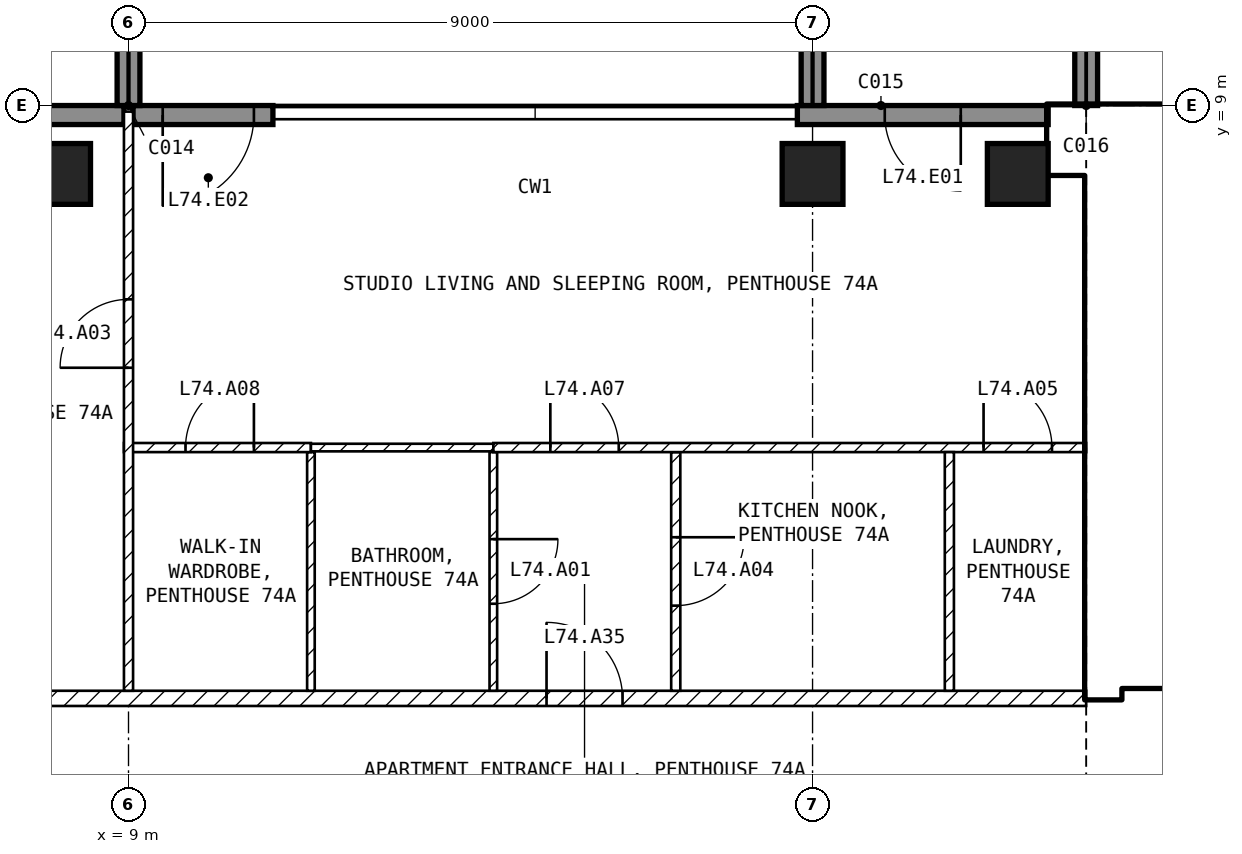
"""IFC4 building model, lengths in metres.
Left out: names, types, materials, properties, quantities, classifications, styles, units other than length and angle.
Written with IfcOpenShell. Run it as: python <this file> out.ifc"""

import sys

from ifc_helpers import new_model, si_unit, direction, frame, frame_2d, origin, origin_2d, place, context, subcontext, project, spatial, rectangle, extrude, element, fill, save


model = new_model("IFC4")
c1 = context("Model", 3, precision=1e-05, world=origin(), true_north=direction((0.0, 1.0)))
c2 = subcontext(c1, "Body", "Model", "MODEL_VIEW")
j1 = project(units=[si_unit("LENGTHUNIT", "METRE"), si_unit("PLANEANGLEUNIT", "RADIAN")], contexts=[c1])
p1 = place(None, origin())
s1 = spatial("IfcSite", under=j1, at=p1, CompositionType="ELEMENT")
p2 = place(p1, origin())
s2 = spatial("IfcBuilding", under=s1, at=p2, CompositionType="ELEMENT")
p3 = place(p2, frame((0.0, 0.0, 290.4)))
s3 = spatial("IfcBuildingStorey", under=s2, at=p3, CompositionType="ELEMENT", Elevation=290.4)
for number, where, z_axis, x_axis in (
    (1, (8.1, 8.1, -0.25), (0.0, 0.0, 1.0), (1.0, 0.0, 0.0)),
    (2, (18.0, 8.1, -0.25), (0.0, 0.0, 1.0), (1.0, 0.0, 0.0)),
    (3, (20.7, 8.1, -0.25), (0.0, 0.0, 1.0), (1.0, 0.0, 0.0)),
):
    element("IfcColumn", number, at=place(p3, frame(where, z_axis=z_axis, x_axis=x_axis)), inside=s3, PredefinedType="COLUMN", context=c2, shape_type="SweptSolid", body=[
        extrude(rectangle(XDim=0.8, YDim=0.8, at=origin_2d()), origin(), (0.0, 0.0, 1.0), 4.2),
    ])
p4 = place(p3, frame((21.1, 8.875, 0.0), z_axis=(0.0, 0.0, 1.0), x_axis=(-1.0, 0.0, 0.0)))
e4 = element("IfcWall", 4, at=p4, inside=s3, PredefinedType="SOLIDWALL", context=c2, shape_type="SweptSolid", body=[
    extrude(rectangle(XDim=3.3, YDim=0.25, at=frame_2d((1.65, 0.0))), origin(), (0.0, 0.0, 1.0), 3.95),
])
p5 = place(p4, frame((1.15, 0.0, 0.0)))
e5 = element("IfcOpeningElement", 5, at=p5, cuts=e4, PredefinedType="OPENING", context=c2, shape_type="SweptSolid", body=[
    extrude(rectangle(XDim=1.0, YDim=2.4, at=frame_2d((0.5, 1.2))), frame((0.0, 0.135, 0.0), z_axis=(0.0, -1.0, 0.0), x_axis=(1.0, 0.0, 0.0)), (0.0, 0.0, 1.0), 0.27),
])
p6 = place(p3, frame((10.9, 8.875, 0.0), z_axis=(0.0, 0.0, 1.0), x_axis=(-1.0, 0.0, 0.0)))
e6 = element("IfcWall", 6, at=p6, inside=s3, PredefinedType="SOLIDWALL", context=c2, shape_type="SweptSolid", body=[
    extrude(rectangle(XDim=1.84, YDim=0.25, at=frame_2d((0.92, 0.0))), origin(), (0.0, 0.0, 1.0), 3.95),
])
p7 = place(p6, frame((0.25, 0.0, 0.0)))
e7 = element("IfcOpeningElement", 7, at=p7, cuts=e6, PredefinedType="OPENING", context=c2, shape_type="SweptSolid", body=[
    extrude(rectangle(XDim=1.2, YDim=2.4, at=frame_2d((0.6, 1.2))), frame((0.0, 0.135, 0.0), z_axis=(0.0, -1.0, 0.0), x_axis=(1.0, 0.0, 0.0)), (0.0, 0.0, 1.0), 0.27),
])
p8 = place(p3, frame((8.94, 8.875, 0.0), z_axis=(0.0, 0.0, 1.0), x_axis=(-1.0, 0.0, 0.0)))
e8 = element("IfcWall", 8, at=p8, inside=s3, PredefinedType="SOLIDWALL", context=c2, shape_type="SweptSolid", body=[
    extrude(rectangle(XDim=3.04, YDim=0.25, at=frame_2d((1.52, 0.0))), origin(), (0.0, 0.0, 1.0), 3.95),
])
p9 = place(p8, frame((1.59, 0.0, 0.0)))
e9 = element("IfcOpeningElement", 9, at=p9, cuts=e8, PredefinedType="OPENING", context=c2, shape_type="SweptSolid", body=[
    extrude(rectangle(XDim=1.2, YDim=2.4, at=frame_2d((0.6, 1.2))), frame((0.0, 0.135, 0.0), z_axis=(0.0, -1.0, 0.0), x_axis=(1.0, 0.0, 0.0)), (0.0, 0.0, 1.0), 0.27),
])
for number, where, z_axis, x_axis in (
    (10, (9.0, 9.0, 0.0), (0.0, 0.0, 1.0), (0.0, 1.0, 0.0)),
    (11, (18.0, 9.0, 0.0), (0.0, 0.0, 1.0), (0.0, 1.0, 0.0)),
    (12, (21.6, 9.0, 0.0), (0.0, 0.0, 1.0), (0.0, 1.0, 0.0)),
):
    element("IfcWall", number, at=place(p3, frame(where, z_axis=z_axis, x_axis=x_axis)), inside=s3, PredefinedType="SOLIDWALL", context=c2, shape_type="SweptSolid", body=[
        extrude(rectangle(XDim=2.7, YDim=0.3, at=frame_2d((1.35, 0.0))), origin(), (0.0, 0.0, 1.0), 3.95),
    ])
p10 = place(p3, frame((21.1, 8.55, 0.0), z_axis=(0.0, 0.0, 1.0), x_axis=(1.0, 0.0, 0.0)))
e13 = element("IfcWall", 13, at=p10, inside=s3, PredefinedType="SHEAR", context=c2, shape_type="SweptSolid", body=[
    extrude(rectangle(XDim=8.65, YDim=0.9, at=frame_2d((4.325, 0.0))), origin(), (0.0, 0.0, 1.0), 3.95),
])
p11 = place(p3, frame((21.825, 1.2, 0.0), z_axis=(0.0, 0.0, 1.0), x_axis=(0.0, 1.0, 0.0)))
e14 = element("IfcWall", 14, at=p11, inside=s3, PredefinedType="SHEAR", context=c2, shape_type="SweptSolid", body=[
    extrude(rectangle(XDim=6.9, YDim=0.45, at=frame_2d((3.45, 0.0))), origin(), (0.0, 0.0, 1.0), 3.95),
])
p12 = place(p3, frame((22.05, 1.45, 0.0), z_axis=(0.0, 0.0, 1.0), x_axis=(1.0, 0.0, 0.0)))
e15 = element("IfcWall", 15, at=p12, inside=s3, PredefinedType="SOLIDWALL", context=c2, shape_type="SweptSolid", body=[
    extrude(rectangle(XDim=11.3, YDim=0.2, at=frame_2d((5.65, 0.0))), origin(), (0.0, 0.0, 1.0), 3.95),
])
p13 = place(p12, frame((0.75, 0.0, 0.0)))
e16 = element("IfcOpeningElement", 16, at=p13, cuts=e15, PredefinedType="OPENING", context=c2, shape_type="SweptSolid", body=[
    extrude(rectangle(XDim=1.0, YDim=2.1, at=frame_2d((0.5, 1.05))), frame((0.0, 0.11, 0.0), z_axis=(0.0, -1.0, 0.0), x_axis=(1.0, 0.0, 0.0)), (0.0, 0.0, 1.0), 0.22),
])
p14 = place(p12, frame((3.25, 0.0, 0.0)))
e17 = element("IfcOpeningElement", 17, at=p14, cuts=e15, PredefinedType="OPENING", context=c2, shape_type="SweptSolid", body=[
    extrude(rectangle(XDim=1.0, YDim=2.1, at=frame_2d((0.5, 1.05))), frame((0.0, 0.11, 0.0), z_axis=(0.0, -1.0, 0.0), x_axis=(1.0, 0.0, 0.0)), (0.0, 0.0, 1.0), 0.22),
])
p15 = place(p12, frame((9.225, 0.0, 0.0)))
e18 = element("IfcOpeningElement", 18, at=p15, cuts=e15, PredefinedType="OPENING", context=c2, shape_type="SweptSolid", body=[
    extrude(rectangle(XDim=0.9, YDim=2.1, at=frame_2d((0.45, 1.05))), frame((0.0, 0.11, 0.0), z_axis=(0.0, -1.0, 0.0), x_axis=(1.0, 0.0, 0.0)), (0.0, 0.0, 1.0), 0.22),
])
p16 = place(p3, frame((22.05, 5.15, 0.0), z_axis=(0.0, 0.0, 1.0), x_axis=(1.0, 0.0, 0.0)))
e19 = element("IfcWall", 19, at=p16, inside=s3, PredefinedType="SOLIDWALL", context=c2, shape_type="SweptSolid", body=[
    extrude(rectangle(XDim=6.3, YDim=0.2, at=frame_2d((3.15, 0.0))), origin(), (0.0, 0.0, 1.0), 3.95),
])
p17 = place(p16, frame((0.2, 0.0, 0.0)))
e20 = element("IfcOpeningElement", 20, at=p17, cuts=e19, PredefinedType="OPENING", context=c2, shape_type="SweptSolid", body=[
    extrude(rectangle(XDim=1.0, YDim=2.1, at=frame_2d((0.5, 1.05))), frame((0.0, 0.11, 0.0), z_axis=(0.0, -1.0, 0.0), x_axis=(1.0, 0.0, 0.0)), (0.0, 0.0, 1.0), 0.22),
])
p18 = place(p3, frame((1.1, 1.2, 0.0), z_axis=(0.0, 0.0, 1.0), x_axis=(1.0, 0.0, 0.0)))
e21 = element("IfcWall", 21, at=p18, inside=s3, PredefinedType="PARTITIONING", context=c2, shape_type="SweptSolid", body=[
    extrude(rectangle(XDim=20.5, YDim=0.2, at=frame_2d((10.25, 0.0))), origin(), (0.0, 0.0, 1.0), 3.95),
])
p19 = place(p18, frame((13.4, 0.0, 0.0)))
e22 = element("IfcOpeningElement", 22, at=p19, cuts=e21, PredefinedType="OPENING", context=c2, shape_type="SweptSolid", body=[
    extrude(rectangle(XDim=1.0, YDim=2.1, at=frame_2d((0.5, 1.05))), frame((0.0, 0.11, 0.0), z_axis=(0.0, -1.0, 0.0), x_axis=(1.0, 0.0, 0.0)), (0.0, 0.0, 1.0), 0.22),
])
p20 = place(p3, frame((11.4, 4.44, 0.0), z_axis=(0.0, 0.0, 1.0), x_axis=(0.0, -1.0, 0.0)))
e23 = element("IfcWall", 23, at=p20, inside=s3, PredefinedType="PARTITIONING", context=c2, shape_type="SweptSolid", body=[
    extrude(rectangle(XDim=3.14, YDim=0.1, at=frame_2d((1.57, 0.0))), origin(), (0.0, 0.0, 1.0), 3.95),
])
p21 = place(p3, frame((8.94, 4.5, 0.0), z_axis=(0.0, 0.0, 1.0), x_axis=(1.0, 0.0, 0.0)))
e24 = element("IfcWall", 24, at=p21, inside=s3, PredefinedType="PARTITIONING", context=c2, shape_type="SweptSolid", body=[
    extrude(rectangle(XDim=2.46, YDim=0.12, at=frame_2d((1.23, 0.0))), origin(), (0.0, 0.0, 1.0), 3.95),
])
p22 = place(p21, frame((0.81, 0.0, 0.0)))
e25 = element("IfcOpeningElement", 25, at=p22, cuts=e24, PredefinedType="OPENING", context=c2, shape_type="SweptSolid", body=[
    extrude(rectangle(XDim=0.9, YDim=2.1, at=frame_2d((0.45, 1.05))), frame((0.0, 0.07, 0.0), z_axis=(0.0, -1.0, 0.0), x_axis=(1.0, 0.0, 0.0)), (0.0, 0.0, 1.0), 0.14),
])
p23 = place(p3, frame((9.0, 1.3, 0.0), z_axis=(0.0, 0.0, 1.0), x_axis=(0.0, 1.0, 0.0)))
e26 = element("IfcWall", 26, at=p23, inside=s3, PredefinedType="PARTITIONING", context=c2, shape_type="SweptSolid", body=[
    extrude(rectangle(XDim=7.62, YDim=0.12, at=frame_2d((3.81, 0.0))), origin(), (0.0, 0.0, 1.0), 3.95),
])
p24 = place(p23, frame((4.25, 0.0, 0.0)))
e27 = element("IfcOpeningElement", 27, at=p24, cuts=e26, PredefinedType="OPENING", context=c2, shape_type="SweptSolid", body=[
    extrude(rectangle(XDim=0.9, YDim=2.1, at=frame_2d((0.45, 1.05))), frame((0.0, 0.07, 0.0), z_axis=(0.0, -1.0, 0.0), x_axis=(1.0, 0.0, 0.0)), (0.0, 0.0, 1.0), 0.14),
])
p25 = place(p3, frame((13.8, 4.44, 0.0), z_axis=(0.0, 0.0, 1.0), x_axis=(0.0, -1.0, 0.0)))
e28 = element("IfcWall", 28, at=p25, inside=s3, PredefinedType="PARTITIONING", context=c2, shape_type="SweptSolid", body=[
    extrude(rectangle(XDim=3.14, YDim=0.1, at=frame_2d((1.57, 0.0))), origin(), (0.0, 0.0, 1.0), 3.95),
])
p26 = place(p25, frame((1.145, 0.0, 0.0)))
e29 = element("IfcOpeningElement", 29, at=p26, cuts=e28, PredefinedType="OPENING", context=c2, shape_type="SweptSolid", body=[
    extrude(rectangle(XDim=0.85, YDim=2.1, at=frame_2d((0.425, 1.05))), frame((0.0, 0.06, 0.0), z_axis=(0.0, -1.0, 0.0), x_axis=(1.0, 0.0, 0.0)), (0.0, 0.0, 1.0), 0.12),
])
p27 = place(p3, frame((11.4, 4.5, 0.0), z_axis=(0.0, 0.0, 1.0), x_axis=(1.0, 0.0, 0.0)))
e30 = element("IfcWall", 30, at=p27, inside=s3, PredefinedType="PARTITIONING", context=c2, shape_type="SweptSolid", body=[
    extrude(rectangle(XDim=2.4, YDim=0.1, at=frame_2d((1.2, 0.0))), origin(), (0.0, 0.0, 1.0), 3.95),
])
p28 = place(p3, frame((16.2, 4.44, 0.0), z_axis=(0.0, 0.0, 1.0), x_axis=(0.0, -1.0, 0.0)))
e31 = element("IfcWall", 31, at=p28, inside=s3, PredefinedType="PARTITIONING", context=c2, shape_type="SweptSolid", body=[
    extrude(rectangle(XDim=3.14, YDim=0.12, at=frame_2d((1.57, 0.0))), origin(), (0.0, 0.0, 1.0), 3.95),
])
p29 = place(p28, frame((1.12, 0.0, 0.0)))
e32 = element("IfcOpeningElement", 32, at=p29, cuts=e31, PredefinedType="OPENING", context=c2, shape_type="SweptSolid", body=[
    extrude(rectangle(XDim=0.9, YDim=2.1, at=frame_2d((0.45, 1.05))), frame((0.0, 0.07, 0.0), z_axis=(0.0, -1.0, 0.0), x_axis=(1.0, 0.0, 0.0)), (0.0, 0.0, 1.0), 0.14),
])
p30 = place(p3, frame((13.8, 4.5, 0.0), z_axis=(0.0, 0.0, 1.0), x_axis=(1.0, 0.0, 0.0)))
e33 = element("IfcWall", 33, at=p30, inside=s3, PredefinedType="PARTITIONING", context=c2, shape_type="SweptSolid", body=[
    extrude(rectangle(XDim=7.8, YDim=0.12, at=frame_2d((3.9, 0.0))), origin(), (0.0, 0.0, 1.0), 3.95),
])
p31 = place(p30, frame((6.45, 0.0, 0.0)))
e34 = element("IfcOpeningElement", 34, at=p31, cuts=e33, PredefinedType="OPENING", context=c2, shape_type="SweptSolid", body=[
    extrude(rectangle(XDim=0.9, YDim=2.1, at=frame_2d((0.45, 1.05))), frame((0.0, 0.07, 0.0), z_axis=(0.0, -1.0, 0.0), x_axis=(1.0, 0.0, 0.0)), (0.0, 0.0, 1.0), 0.14),
])
p32 = place(p30, frame((0.75, 0.0, 0.0)))
e35 = element("IfcOpeningElement", 35, at=p32, cuts=e33, PredefinedType="OPENING", context=c2, shape_type="SweptSolid", body=[
    extrude(rectangle(XDim=0.9, YDim=2.1, at=frame_2d((0.45, 1.05))), frame((0.0, 0.07, 0.0), z_axis=(0.0, -1.0, 0.0), x_axis=(1.0, 0.0, 0.0)), (0.0, 0.0, 1.0), 0.14),
])
p33 = place(p3, frame((19.8, 4.44, 0.0), z_axis=(0.0, 0.0, 1.0), x_axis=(0.0, -1.0, 0.0)))
e36 = element("IfcWall", 36, at=p33, inside=s3, PredefinedType="PARTITIONING", context=c2, shape_type="SweptSolid", body=[
    extrude(rectangle(XDim=3.14, YDim=0.12, at=frame_2d((1.57, 0.0))), origin(), (0.0, 0.0, 1.0), 3.95),
])
p34 = place(p5, origin())
e37 = element("IfcDoor", 37, at=p34, inside=s3, OperationType="SINGLE_SWING_LEFT", PredefinedType="DOOR", context=c2, shape_type="SweptSolid", body=[
    extrude(rectangle(XDim=1.0, YDim=2.4, at=frame_2d((0.5, 1.2))), frame((0.0, 0.025, 0.0), z_axis=(0.0, -1.0, 0.0), x_axis=(1.0, 0.0, 0.0)), (0.0, 0.0, 1.0), 0.05),
])
fill(e5, e37)
p35 = place(p7, origin())
e38 = element("IfcDoor", 38, at=p35, inside=s3, OperationType="SINGLE_SWING_RIGHT", PredefinedType="DOOR", context=c2, shape_type="SweptSolid", body=[
    extrude(rectangle(XDim=1.2, YDim=2.4, at=frame_2d((0.6, 1.2))), frame((0.0, 0.025, 0.0), z_axis=(0.0, -1.0, 0.0), x_axis=(1.0, 0.0, 0.0)), (0.0, 0.0, 1.0), 0.05),
])
fill(e7, e38)
p36 = place(p17, origin())
e39 = element("IfcDoor", 39, at=p36, inside=s3, OperationType="SINGLE_SWING_LEFT", PredefinedType="DOOR", context=c2, shape_type="SweptSolid", body=[
    extrude(rectangle(XDim=1.0, YDim=2.1, at=frame_2d((0.5, 1.05))), frame((0.0, 0.025, 0.0), z_axis=(0.0, -1.0, 0.0), x_axis=(1.0, 0.0, 0.0)), (0.0, 0.0, 1.0), 0.05),
])
fill(e20, e39)
p37 = place(p26, origin())
e40 = element("IfcDoor", 40, at=p37, inside=s3, OperationType="SINGLE_SWING_LEFT", PredefinedType="DOOR", context=c2, shape_type="SweptSolid", body=[
    extrude(rectangle(XDim=0.85, YDim=2.1, at=frame_2d((0.425, 1.05))), frame((0.0, 0.025, 0.0), z_axis=(0.0, -1.0, 0.0), x_axis=(1.0, 0.0, 0.0)), (0.0, 0.0, 1.0), 0.05),
])
fill(e29, e40)
p38 = place(p24, origin())
e41 = element("IfcDoor", 41, at=p38, inside=s3, OperationType="SINGLE_SWING_LEFT", PredefinedType="DOOR", context=c2, shape_type="SweptSolid", body=[
    extrude(rectangle(XDim=0.9, YDim=2.1, at=frame_2d((0.45, 1.05))), frame((0.0, 0.025, 0.0), z_axis=(0.0, -1.0, 0.0), x_axis=(1.0, 0.0, 0.0)), (0.0, 0.0, 1.0), 0.05),
])
fill(e27, e41)
p39 = place(p29, origin())
e42 = element("IfcDoor", 42, at=p39, inside=s3, OperationType="SINGLE_SWING_LEFT", PredefinedType="DOOR", context=c2, shape_type="SweptSolid", body=[
    extrude(rectangle(XDim=0.9, YDim=2.1, at=frame_2d((0.45, 1.05))), frame((0.0, 0.025, 0.0), z_axis=(0.0, -1.0, 0.0), x_axis=(1.0, 0.0, 0.0)), (0.0, 0.0, 1.0), 0.05),
])
fill(e32, e42)
p40 = place(p31, origin())
e43 = element("IfcDoor", 43, at=p40, inside=s3, OperationType="SINGLE_SWING_LEFT", PredefinedType="DOOR", context=c2, shape_type="SweptSolid", body=[
    extrude(rectangle(XDim=0.9, YDim=2.1, at=frame_2d((0.45, 1.05))), frame((0.0, 0.025, 0.0), z_axis=(0.0, -1.0, 0.0), x_axis=(1.0, 0.0, 0.0)), (0.0, 0.0, 1.0), 0.05),
])
fill(e34, e43)
p41 = place(p32, origin())
e44 = element("IfcDoor", 44, at=p41, inside=s3, OperationType="SINGLE_SWING_LEFT", PredefinedType="DOOR", context=c2, shape_type="SweptSolid", body=[
    extrude(rectangle(XDim=0.9, YDim=2.1, at=frame_2d((0.45, 1.05))), frame((0.0, 0.025, 0.0), z_axis=(0.0, -1.0, 0.0), x_axis=(1.0, 0.0, 0.0)), (0.0, 0.0, 1.0), 0.05),
])
fill(e35, e44)
p42 = place(p22, origin())
e45 = element("IfcDoor", 45, at=p42, inside=s3, OperationType="SINGLE_SWING_RIGHT", PredefinedType="DOOR", context=c2, shape_type="SweptSolid", body=[
    extrude(rectangle(XDim=0.9, YDim=2.1, at=frame_2d((0.45, 1.05))), frame((0.0, 0.025, 0.0), z_axis=(0.0, -1.0, 0.0), x_axis=(1.0, 0.0, 0.0)), (0.0, 0.0, 1.0), 0.05),
])
fill(e25, e45)
p43 = place(p19, origin())
e46 = element("IfcDoor", 46, at=p43, inside=s3, OperationType="SINGLE_SWING_LEFT", PredefinedType="DOOR", context=c2, shape_type="SweptSolid", body=[
    extrude(rectangle(XDim=1.0, YDim=2.1, at=frame_2d((0.5, 1.05))), frame((0.0, 0.025, 0.0), z_axis=(0.0, -1.0, 0.0), x_axis=(1.0, 0.0, 0.0)), (0.0, 0.0, 1.0), 0.05),
])
fill(e22, e46)
save(model, sys.argv[1])
